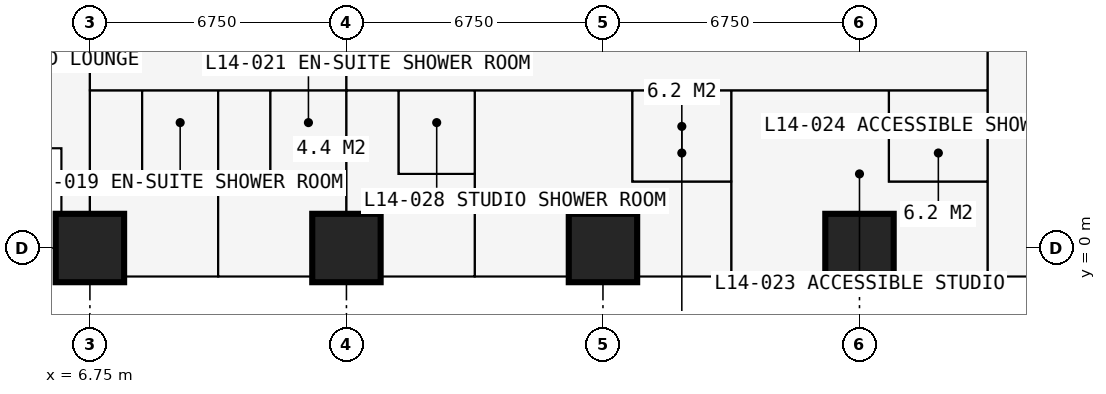
"""IFC4 building model, lengths in metres.
Left out: names, types, materials, properties, quantities, classifications, styles, units other than length and angle.
Written with IfcOpenShell. Run it as: python <this file> out.ifc"""

import sys

from ifc_helpers import new_model, si_unit, direction, frame, frame_2d, origin, origin_2d, place, context, subcontext, project, spatial, rectangle, extrude, element, fill, save


model = new_model("IFC4")
c1 = context("Model", 3, precision=1e-05, world=origin(), true_north=direction((0.0, 1.0)))
c2 = subcontext(c1, "Body", "Model", "MODEL_VIEW")
j1 = project(units=[si_unit("LENGTHUNIT", "METRE"), si_unit("PLANEANGLEUNIT", "RADIAN")], contexts=[c1])
p1 = place(None, origin())
s1 = spatial("IfcSite", under=j1, at=p1, CompositionType="ELEMENT")
p2 = place(p1, origin())
s2 = spatial("IfcBuilding", under=s1, at=p2, CompositionType="ELEMENT")
p3 = place(p2, frame((0.0, 0.0, 54.0)))
s3 = spatial("IfcBuildingStorey", under=s2, at=p3, CompositionType="ELEMENT", Elevation=54.0)
for number, where, z_axis, x_axis in (
    (1, (6.75, 0.0, 0.0), (0.0, 0.0, 1.0), (1.0, 0.0, 0.0)),
    (2, (13.5, 0.0, 0.0), (0.0, 0.0, 1.0), (1.0, 0.0, 0.0)),
    (3, (20.25, 0.0, 0.0), (0.0, 0.0, 1.0), (1.0, 0.0, 0.0)),
    (4, (27.0, 0.0, 0.0), (0.0, 0.0, 1.0), (1.0, 0.0, 0.0)),
):
    element("IfcColumn", number, at=place(p3, frame(where, z_axis=z_axis, x_axis=x_axis)), inside=s3, PredefinedType="COLUMN", context=c2, shape_type="SweptSolid", body=[
        extrude(rectangle(XDim=1.8, YDim=1.8, at=origin_2d()), origin(), (0.0, 0.0, 1.0), 3.6),
    ])
p4 = place(p3, frame((2.625, 2.625, 0.0), z_axis=(0.0, 0.0, 1.0), x_axis=(1.0, 0.0, 0.0)))
e5 = element("IfcWall", 5, at=p4, inside=s3, PredefinedType="SOLIDWALL", context=c2, shape_type="SweptSolid", body=[
    extrude(rectangle(XDim=3.375, YDim=0.3, at=frame_2d((1.688, 0.0))), origin(), (0.0, 0.0, 1.0), 3.375),
])
p5 = place(p4, frame((0.788, 0.0, 0.6)))
e6 = element("IfcOpeningElement", 6, at=p5, cuts=e5, PredefinedType="OPENING", context=c2, shape_type="SweptSolid", body=[
    extrude(rectangle(XDim=1.8, YDim=2.1, at=frame_2d((0.9, 1.05))), frame((0.0, 0.16, 0.0), z_axis=(0.0, -1.0, 0.0), x_axis=(1.0, 0.0, 0.0)), (0.0, 0.0, 1.0), 0.32),
])
p6 = place(p3, frame((6.0, 2.625, 0.0), z_axis=(0.0, 0.0, 1.0), x_axis=(0.0, -1.0, 0.0)))
e7 = element("IfcWall", 7, at=p6, inside=s3, PredefinedType="SOLIDWALL", context=c2, shape_type="SweptSolid", body=[
    extrude(rectangle(XDim=3.375, YDim=0.3, at=frame_2d((1.688, 0.0))), origin(), (0.0, 0.0, 1.0), 3.375),
])
p7 = place(p6, frame((0.343, 0.0, 0.9)))
e8 = element("IfcOpeningElement", 8, at=p7, cuts=e7, PredefinedType="OPENING", context=c2, shape_type="SweptSolid", body=[
    extrude(rectangle(XDim=1.2, YDim=1.8, at=frame_2d((0.6, 0.9))), frame((0.0, 0.16, 0.0), z_axis=(0.0, -1.0, 0.0), x_axis=(1.0, 0.0, 0.0)), (0.0, 0.0, 1.0), 0.32),
])
p8 = place(p3, frame((20.25, -0.75, 0.0), z_axis=(0.0, 0.0, 1.0), x_axis=(-1.0, 0.0, 0.0)))
e9 = element("IfcWall", 9, at=p8, inside=s3, PredefinedType="SOLIDWALL", context=c2, shape_type="SweptSolid", body=[
    extrude(rectangle(XDim=6.75, YDim=0.15, at=frame_2d((3.375, 0.0))), origin(), (0.0, 0.0, 1.0), 3.375),
])
p9 = place(p8, frame((0.962, 0.0, 0.0)))
e10 = element("IfcOpeningElement", 10, at=p9, cuts=e9, PredefinedType="OPENING", context=c2, shape_type="SweptSolid", body=[
    extrude(rectangle(XDim=1.0, YDim=2.2, at=frame_2d((0.5, 1.1))), frame((0.0, 0.085, 0.0), z_axis=(0.0, -1.0, 0.0), x_axis=(1.0, 0.0, 0.0)), (0.0, 0.0, 1.0), 0.17),
])
p10 = place(p8, frame((2.025, 0.0, 0.9)))
e11 = element("IfcOpeningElement", 11, at=p10, cuts=e9, PredefinedType="OPENING", context=c2, shape_type="SweptSolid", body=[
    extrude(rectangle(XDim=1.2, YDim=1.8, at=frame_2d((0.6, 0.9))), frame((0.0, 0.085, 0.0), z_axis=(0.0, -1.0, 0.0), x_axis=(1.0, 0.0, 0.0)), (0.0, 0.0, 1.0), 0.17),
])
p11 = place(p8, frame((4.788, 0.0, 0.0)))
e12 = element("IfcOpeningElement", 12, at=p11, cuts=e9, PredefinedType="OPENING", context=c2, shape_type="SweptSolid", body=[
    extrude(rectangle(XDim=1.0, YDim=2.2, at=frame_2d((0.5, 1.1))), frame((0.0, 0.085, 0.0), z_axis=(0.0, -1.0, 0.0), x_axis=(1.0, 0.0, 0.0)), (0.0, 0.0, 1.0), 0.17),
])
p12 = place(p8, frame((3.525, 0.0, 0.9)))
e13 = element("IfcOpeningElement", 13, at=p12, cuts=e9, PredefinedType="OPENING", context=c2, shape_type="SweptSolid", body=[
    extrude(rectangle(XDim=1.2, YDim=1.8, at=frame_2d((0.6, 0.9))), frame((0.0, 0.085, 0.0), z_axis=(0.0, -1.0, 0.0), x_axis=(1.0, 0.0, 0.0)), (0.0, 0.0, 1.0), 0.17),
])
p13 = place(p3, frame((16.875, -0.85, 0.0), z_axis=(0.0, 0.0, 1.0), x_axis=(0.0, -1.0, 0.0)))
e14 = element("IfcWall", 14, at=p13, inside=s3, PredefinedType="USERDEFINED", context=c2, shape_type="SweptSolid", body=[
    extrude(rectangle(XDim=2.2, YDim=1.0, at=frame_2d((1.1, 0.0))), origin(), (0.0, 0.0, 1.0), 0.9),
])
p14 = place(p3, frame((6.75, -0.734, 0.0), z_axis=(0.0, 0.0, 1.0), x_axis=(0.0, 1.0, 0.0)))
e15 = element("IfcWall", 15, at=p14, inside=s3, PredefinedType="PARTITIONING", context=c2, shape_type="SweptSolid", body=[
    extrude(rectangle(XDim=10.859, YDim=0.15, at=frame_2d((5.429, 0.0))), origin(), (0.0, 0.0, 1.0), 2.877),
])
p15 = place(p3, frame((6.75, 4.15, 0.0), z_axis=(0.0, 0.0, 1.0), x_axis=(1.0, 0.0, 0.0)))
e16 = element("IfcWall", 16, at=p15, inside=s3, PredefinedType="PARTITIONING", context=c2, shape_type="SweptSolid", body=[
    extrude(rectangle(XDim=23.625, YDim=0.15, at=frame_2d((11.812, 0.0))), origin(), (0.0, 0.0, 1.0), 3.375),
])
p16 = place(p15, frame((0.2, 0.0, 0.0)))
e17 = element("IfcOpeningElement", 17, at=p16, cuts=e16, PredefinedType="OPENING", context=c2, shape_type="SweptSolid", body=[
    extrude(rectangle(XDim=0.95, YDim=2.2, at=frame_2d((0.475, 1.1))), frame((0.0, 0.085, 0.0), z_axis=(0.0, -1.0, 0.0), x_axis=(1.0, 0.0, 0.0)), (0.0, 0.0, 1.0), 0.17),
])
p17 = place(p15, frame((3.625, 0.0, 0.0)))
e18 = element("IfcOpeningElement", 18, at=p17, cuts=e16, PredefinedType="OPENING", context=c2, shape_type="SweptSolid", body=[
    extrude(rectangle(XDim=0.95, YDim=2.2, at=frame_2d((0.475, 1.1))), frame((0.0, 0.085, 0.0), z_axis=(0.0, -1.0, 0.0), x_axis=(1.0, 0.0, 0.0)), (0.0, 0.0, 1.0), 0.17),
])
p18 = place(p15, frame((18.475, 0.0, 0.0)))
e19 = element("IfcOpeningElement", 19, at=p18, cuts=e16, PredefinedType="OPENING", context=c2, shape_type="SweptSolid", body=[
    extrude(rectangle(XDim=0.95, YDim=2.2, at=frame_2d((0.475, 1.1))), frame((0.0, 0.085, 0.0), z_axis=(0.0, -1.0, 0.0), x_axis=(1.0, 0.0, 0.0)), (0.0, 0.0, 1.0), 0.17),
])
p19 = place(p15, frame((11.725, 0.0, 0.0)))
e20 = element("IfcOpeningElement", 20, at=p19, cuts=e16, PredefinedType="OPENING", context=c2, shape_type="SweptSolid", body=[
    extrude(rectangle(XDim=0.95, YDim=2.2, at=frame_2d((0.475, 1.1))), frame((0.0, 0.085, 0.0), z_axis=(0.0, -1.0, 0.0), x_axis=(1.0, 0.0, 0.0)), (0.0, 0.0, 1.0), 0.17),
])
p20 = place(p15, frame((6.95, 0.0, 0.0)))
e21 = element("IfcOpeningElement", 21, at=p20, cuts=e16, PredefinedType="OPENING", context=c2, shape_type="SweptSolid", body=[
    extrude(rectangle(XDim=0.95, YDim=2.2, at=frame_2d((0.475, 1.1))), frame((0.0, 0.085, 0.0), z_axis=(0.0, -1.0, 0.0), x_axis=(1.0, 0.0, 0.0)), (0.0, 0.0, 1.0), 0.17),
])
p21 = place(p3, frame((8.125, 1.95, 0.0), z_axis=(0.0, 0.0, 1.0), x_axis=(0.0, 1.0, 0.0)))
e22 = element("IfcWall", 22, at=p21, inside=s3, PredefinedType="PARTITIONING", context=c2, shape_type="SweptSolid", body=[
    extrude(rectangle(XDim=2.2, YDim=0.1, at=frame_2d((1.1, 0.0))), origin(), (0.0, 0.0, 1.0), 3.375),
])
p22 = place(p21, frame((0.65, 0.0, 0.0)))
e23 = element("IfcOpeningElement", 23, at=p22, cuts=e22, PredefinedType="OPENING", context=c2, shape_type="SweptSolid", body=[
    extrude(rectangle(XDim=0.9, YDim=2.2, at=frame_2d((0.45, 1.1))), frame((0.0, 0.06, 0.0), z_axis=(0.0, -1.0, 0.0), x_axis=(1.0, 0.0, 0.0)), (0.0, 0.0, 1.0), 0.12),
])
p23 = place(p3, frame((8.125, 1.95, 0.0), z_axis=(0.0, 0.0, 1.0), x_axis=(1.0, 0.0, 0.0)))
e24 = element("IfcWall", 24, at=p23, inside=s3, PredefinedType="PARTITIONING", context=c2, shape_type="SweptSolid", body=[
    extrude(rectangle(XDim=2.0, YDim=0.1, at=frame_2d((1.0, 0.0))), origin(), (0.0, 0.0, 1.0), 3.375),
])
p24 = place(p3, frame((10.125, -0.734, 0.0), z_axis=(0.0, 0.0, 1.0), x_axis=(0.0, 1.0, 0.0)))
e25 = element("IfcWall", 25, at=p24, inside=s3, PredefinedType="PARTITIONING", context=c2, shape_type="SweptSolid", body=[
    extrude(rectangle(XDim=4.884, YDim=0.175, at=frame_2d((2.442, 0.0))), origin(), (0.0, 0.0, 1.0), 3.375),
])
p25 = place(p3, frame((11.5, 1.95, 0.0), z_axis=(0.0, 0.0, 1.0), x_axis=(0.0, 1.0, 0.0)))
e26 = element("IfcWall", 26, at=p25, inside=s3, PredefinedType="PARTITIONING", context=c2, shape_type="SweptSolid", body=[
    extrude(rectangle(XDim=2.2, YDim=0.1, at=frame_2d((1.1, 0.0))), origin(), (0.0, 0.0, 1.0), 3.375),
])
p26 = place(p25, frame((0.65, 0.0, 0.0)))
e27 = element("IfcOpeningElement", 27, at=p26, cuts=e26, PredefinedType="OPENING", context=c2, shape_type="SweptSolid", body=[
    extrude(rectangle(XDim=0.9, YDim=2.2, at=frame_2d((0.45, 1.1))), frame((0.0, 0.06, 0.0), z_axis=(0.0, -1.0, 0.0), x_axis=(1.0, 0.0, 0.0)), (0.0, 0.0, 1.0), 0.12),
])
p27 = place(p3, frame((11.5, 1.95, 0.0), z_axis=(0.0, 0.0, 1.0), x_axis=(1.0, 0.0, 0.0)))
e28 = element("IfcWall", 28, at=p27, inside=s3, PredefinedType="PARTITIONING", context=c2, shape_type="SweptSolid", body=[
    extrude(rectangle(XDim=2.0, YDim=0.1, at=frame_2d((1.0, 0.0))), origin(), (0.0, 0.0, 1.0), 3.375),
])
p28 = place(p3, frame((13.5, -0.734, 0.0), z_axis=(0.0, 0.0, 1.0), x_axis=(0.0, 1.0, 0.0)))
e29 = element("IfcWall", 29, at=p28, inside=s3, PredefinedType="PARTITIONING", context=c2, shape_type="SweptSolid", body=[
    extrude(rectangle(XDim=12.034, YDim=0.15, at=frame_2d((6.017, 0.0))), origin(), (0.0, 0.0, 1.0), 2.877),
])
p29 = place(p3, frame((14.875, 1.95, 0.0), z_axis=(0.0, 0.0, 1.0), x_axis=(0.0, 1.0, 0.0)))
e30 = element("IfcWall", 30, at=p29, inside=s3, PredefinedType="PARTITIONING", context=c2, shape_type="SweptSolid", body=[
    extrude(rectangle(XDim=2.2, YDim=0.1, at=frame_2d((1.1, 0.0))), origin(), (0.0, 0.0, 1.0), 3.375),
])
p30 = place(p3, frame((14.875, 1.95, 0.0), z_axis=(0.0, 0.0, 1.0), x_axis=(1.0, 0.0, 0.0)))
e31 = element("IfcWall", 31, at=p30, inside=s3, PredefinedType="PARTITIONING", context=c2, shape_type="SweptSolid", body=[
    extrude(rectangle(XDim=2.0, YDim=0.1, at=frame_2d((1.0, 0.0))), origin(), (0.0, 0.0, 1.0), 3.375),
])
p31 = place(p3, frame((16.875, -0.734, 0.0), z_axis=(0.0, 0.0, 1.0), x_axis=(0.0, 1.0, 0.0)))
e32 = element("IfcWall", 32, at=p31, inside=s3, PredefinedType="PARTITIONING", context=c2, shape_type="SweptSolid", body=[
    extrude(rectangle(XDim=4.884, YDim=0.175, at=frame_2d((2.442, 0.0))), origin(), (0.0, 0.0, 1.0), 3.375),
])
p32 = place(p31, frame((3.334, 0.0, 0.0)))
e33 = element("IfcOpeningElement", 33, at=p32, cuts=e32, PredefinedType="OPENING", context=c2, shape_type="SweptSolid", body=[
    extrude(rectangle(XDim=0.9, YDim=2.2, at=frame_2d((0.45, 1.1))), frame((0.0, 0.097, 0.0), z_axis=(0.0, -1.0, 0.0), x_axis=(1.0, 0.0, 0.0)), (0.0, 0.0, 1.0), 0.195),
])
p33 = place(p3, frame((21.025, 1.75, 0.0), z_axis=(0.0, 0.0, 1.0), x_axis=(0.0, 1.0, 0.0)))
e34 = element("IfcWall", 34, at=p33, inside=s3, PredefinedType="PARTITIONING", context=c2, shape_type="SweptSolid", body=[
    extrude(rectangle(XDim=2.4, YDim=0.1, at=frame_2d((1.2, 0.0))), origin(), (0.0, 0.0, 1.0), 3.375),
])
p34 = place(p3, frame((21.025, 1.75, 0.0), z_axis=(0.0, 0.0, 1.0), x_axis=(1.0, 0.0, 0.0)))
e35 = element("IfcWall", 35, at=p34, inside=s3, PredefinedType="PARTITIONING", context=c2, shape_type="SweptSolid", body=[
    extrude(rectangle(XDim=2.6, YDim=0.1, at=frame_2d((1.3, 0.0))), origin(), (0.0, 0.0, 1.0), 3.375),
])
p35 = place(p3, frame((23.625, -0.734, 0.0), z_axis=(0.0, 0.0, 1.0), x_axis=(0.0, 1.0, 0.0)))
e36 = element("IfcWall", 36, at=p35, inside=s3, PredefinedType="PARTITIONING", context=c2, shape_type="SweptSolid", body=[
    extrude(rectangle(XDim=4.884, YDim=0.175, at=frame_2d((2.442, 0.0))), origin(), (0.0, 0.0, 1.0), 3.375),
])
p36 = place(p35, frame((3.234, 0.0, 0.0)))
e37 = element("IfcOpeningElement", 37, at=p36, cuts=e36, PredefinedType="OPENING", context=c2, shape_type="SweptSolid", body=[
    extrude(rectangle(XDim=0.9, YDim=2.2, at=frame_2d((0.45, 1.1))), frame((0.0, 0.097, 0.0), z_axis=(0.0, -1.0, 0.0), x_axis=(1.0, 0.0, 0.0)), (0.0, 0.0, 1.0), 0.195),
])
p37 = place(p3, frame((27.775, 1.75, 0.0), z_axis=(0.0, 0.0, 1.0), x_axis=(0.0, 1.0, 0.0)))
e38 = element("IfcWall", 38, at=p37, inside=s3, PredefinedType="PARTITIONING", context=c2, shape_type="SweptSolid", body=[
    extrude(rectangle(XDim=2.4, YDim=0.1, at=frame_2d((1.2, 0.0))), origin(), (0.0, 0.0, 1.0), 3.375),
])
p38 = place(p3, frame((27.775, 1.75, 0.0), z_axis=(0.0, 0.0, 1.0), x_axis=(1.0, 0.0, 0.0)))
e39 = element("IfcWall", 39, at=p38, inside=s3, PredefinedType="PARTITIONING", context=c2, shape_type="SweptSolid", body=[
    extrude(rectangle(XDim=2.6, YDim=0.1, at=frame_2d((1.3, 0.0))), origin(), (0.0, 0.0, 1.0), 3.375),
])
p39 = place(p38, frame((0.85, 0.0, 0.0)))
e40 = element("IfcOpeningElement", 40, at=p39, cuts=e39, PredefinedType="OPENING", context=c2, shape_type="SweptSolid", body=[
    extrude(rectangle(XDim=0.9, YDim=2.2, at=frame_2d((0.45, 1.1))), frame((0.0, 0.06, 0.0), z_axis=(0.0, -1.0, 0.0), x_axis=(1.0, 0.0, 0.0)), (0.0, 0.0, 1.0), 0.12),
])
p40 = place(p3, frame((30.375, -0.734, 0.0), z_axis=(0.0, 0.0, 1.0), x_axis=(0.0, 1.0, 0.0)))
e41 = element("IfcWall", 41, at=p40, inside=s3, PredefinedType="PARTITIONING", context=c2, shape_type="SweptSolid", body=[
    extrude(rectangle(XDim=12.034, YDim=0.15, at=frame_2d((6.017, 0.0))), origin(), (0.0, 0.0, 1.0), 3.375),
])
p41 = place(p40, frame((5.134, 0.0, 0.0)))
e42 = element("IfcOpeningElement", 42, at=p41, cuts=e41, PredefinedType="OPENING", context=c2, shape_type="SweptSolid", body=[
    extrude(rectangle(XDim=1.0, YDim=2.2, at=frame_2d((0.5, 1.1))), frame((0.0, 0.085, 0.0), z_axis=(0.0, -1.0, 0.0), x_axis=(1.0, 0.0, 0.0)), (0.0, 0.0, 1.0), 0.17),
])
p42 = place(p7, origin())
e43 = element("IfcWindow", 43, at=p42, inside=s3, PartitioningType="SINGLE_PANEL", PredefinedType="WINDOW", context=c2, shape_type="SweptSolid", body=[
    extrude(rectangle(XDim=1.2, YDim=1.8, at=frame_2d((0.6, 0.9))), frame((0.0, 0.03, 0.0), z_axis=(0.0, -1.0, 0.0), x_axis=(1.0, 0.0, 0.0)), (0.0, 0.0, 1.0), 0.06),
])
fill(e8, e43)
p43 = place(p9, origin())
e44 = element("IfcDoor", 44, at=p43, inside=s3, OperationType="SINGLE_SWING_LEFT", PredefinedType="DOOR", context=c2, shape_type="SweptSolid", body=[
    extrude(rectangle(XDim=1.0, YDim=2.2, at=frame_2d((0.5, 1.1))), frame((0.0, 0.025, 0.0), z_axis=(0.0, -1.0, 0.0), x_axis=(1.0, 0.0, 0.0)), (0.0, 0.0, 1.0), 0.05),
])
fill(e10, e44)
p44 = place(p10, origin())
e45 = element("IfcWindow", 45, at=p44, inside=s3, PartitioningType="SINGLE_PANEL", PredefinedType="WINDOW", context=c2, shape_type="SweptSolid", body=[
    extrude(rectangle(XDim=1.2, YDim=1.8, at=frame_2d((0.6, 0.9))), frame((0.0, 0.03, 0.0), z_axis=(0.0, -1.0, 0.0), x_axis=(1.0, 0.0, 0.0)), (0.0, 0.0, 1.0), 0.06),
])
fill(e11, e45)
p45 = place(p11, origin())
e46 = element("IfcDoor", 46, at=p45, inside=s3, OperationType="SINGLE_SWING_RIGHT", PredefinedType="DOOR", context=c2, shape_type="SweptSolid", body=[
    extrude(rectangle(XDim=1.0, YDim=2.2, at=frame_2d((0.5, 1.1))), frame((0.0, 0.025, 0.0), z_axis=(0.0, -1.0, 0.0), x_axis=(1.0, 0.0, 0.0)), (0.0, 0.0, 1.0), 0.05),
])
fill(e12, e46)
p46 = place(p12, origin())
e47 = element("IfcWindow", 47, at=p46, inside=s3, PartitioningType="SINGLE_PANEL", PredefinedType="WINDOW", context=c2, shape_type="SweptSolid", body=[
    extrude(rectangle(XDim=1.2, YDim=1.8, at=frame_2d((0.6, 0.9))), frame((0.0, 0.03, 0.0), z_axis=(0.0, -1.0, 0.0), x_axis=(1.0, 0.0, 0.0)), (0.0, 0.0, 1.0), 0.06),
])
fill(e13, e47)
p47 = place(p16, origin())
e48 = element("IfcDoor", 48, at=p47, inside=s3, OperationType="SINGLE_SWING_LEFT", PredefinedType="DOOR", context=c2, shape_type="SweptSolid", body=[
    extrude(rectangle(XDim=0.95, YDim=2.2, at=frame_2d((0.475, 1.1))), frame((0.0, 0.025, 0.0), z_axis=(0.0, -1.0, 0.0), x_axis=(1.0, 0.0, 0.0)), (0.0, 0.0, 1.0), 0.05),
])
fill(e17, e48)
p48 = place(p22, origin())
e49 = element("IfcDoor", 49, at=p48, inside=s3, OperationType="SINGLE_SWING_RIGHT", PredefinedType="DOOR", context=c2, shape_type="SweptSolid", body=[
    extrude(rectangle(XDim=0.9, YDim=2.2, at=frame_2d((0.45, 1.1))), frame((0.0, 0.025, 0.0), z_axis=(0.0, -1.0, 0.0), x_axis=(1.0, 0.0, 0.0)), (0.0, 0.0, 1.0), 0.05),
])
fill(e23, e49)
p49 = place(p17, origin())
e50 = element("IfcDoor", 50, at=p49, inside=s3, OperationType="SINGLE_SWING_LEFT", PredefinedType="DOOR", context=c2, shape_type="SweptSolid", body=[
    extrude(rectangle(XDim=0.95, YDim=2.2, at=frame_2d((0.475, 1.1))), frame((0.0, 0.025, 0.0), z_axis=(0.0, -1.0, 0.0), x_axis=(1.0, 0.0, 0.0)), (0.0, 0.0, 1.0), 0.05),
])
fill(e18, e50)
p50 = place(p26, origin())
e51 = element("IfcDoor", 51, at=p50, inside=s3, OperationType="SINGLE_SWING_RIGHT", PredefinedType="DOOR", context=c2, shape_type="SweptSolid", body=[
    extrude(rectangle(XDim=0.9, YDim=2.2, at=frame_2d((0.45, 1.1))), frame((0.0, 0.025, 0.0), z_axis=(0.0, -1.0, 0.0), x_axis=(1.0, 0.0, 0.0)), (0.0, 0.0, 1.0), 0.05),
])
fill(e27, e51)
p51 = place(p18, origin())
e52 = element("IfcDoor", 52, at=p51, inside=s3, OperationType="SINGLE_SWING_LEFT", PredefinedType="DOOR", context=c2, shape_type="SweptSolid", body=[
    extrude(rectangle(XDim=0.95, YDim=2.2, at=frame_2d((0.475, 1.1))), frame((0.0, 0.025, 0.0), z_axis=(0.0, -1.0, 0.0), x_axis=(1.0, 0.0, 0.0)), (0.0, 0.0, 1.0), 0.05),
])
fill(e19, e52)
p52 = place(p39, origin())
e53 = element("IfcDoor", 53, at=p52, inside=s3, OperationType="SINGLE_SWING_RIGHT", PredefinedType="DOOR", context=c2, shape_type="SweptSolid", body=[
    extrude(rectangle(XDim=0.9, YDim=2.2, at=frame_2d((0.45, 1.1))), frame((0.0, 0.025, 0.0), z_axis=(0.0, -1.0, 0.0), x_axis=(1.0, 0.0, 0.0)), (0.0, 0.0, 1.0), 0.05),
])
fill(e40, e53)
p53 = place(p19, origin())
e54 = element("IfcDoor", 54, at=p53, inside=s3, OperationType="SINGLE_SWING_LEFT", PredefinedType="DOOR", context=c2, shape_type="SweptSolid", body=[
    extrude(rectangle(XDim=0.95, YDim=2.2, at=frame_2d((0.475, 1.1))), frame((0.0, 0.025, 0.0), z_axis=(0.0, -1.0, 0.0), x_axis=(1.0, 0.0, 0.0)), (0.0, 0.0, 1.0), 0.05),
])
fill(e20, e54)
p54 = place(p36, origin())
e55 = element("IfcDoor", 55, at=p54, inside=s3, OperationType="SINGLE_SWING_RIGHT", PredefinedType="DOOR", context=c2, shape_type="SweptSolid", body=[
    extrude(rectangle(XDim=0.9, YDim=2.2, at=frame_2d((0.45, 1.1))), frame((0.0, 0.025, 0.0), z_axis=(0.0, -1.0, 0.0), x_axis=(1.0, 0.0, 0.0)), (0.0, 0.0, 1.0), 0.05),
])
fill(e37, e55)
p55 = place(p20, origin())
e56 = element("IfcDoor", 56, at=p55, inside=s3, OperationType="SINGLE_SWING_LEFT", PredefinedType="DOOR", context=c2, shape_type="SweptSolid", body=[
    extrude(rectangle(XDim=0.95, YDim=2.2, at=frame_2d((0.475, 1.1))), frame((0.0, 0.025, 0.0), z_axis=(0.0, -1.0, 0.0), x_axis=(1.0, 0.0, 0.0)), (0.0, 0.0, 1.0), 0.05),
])
fill(e21, e56)
p56 = place(p32, origin())
e57 = element("IfcDoor", 57, at=p56, inside=s3, OperationType="SINGLE_SWING_RIGHT", PredefinedType="DOOR", context=c2, shape_type="SweptSolid", body=[
    extrude(rectangle(XDim=0.9, YDim=2.2, at=frame_2d((0.45, 1.1))), frame((0.0, 0.025, 0.0), z_axis=(0.0, -1.0, 0.0), x_axis=(1.0, 0.0, 0.0)), (0.0, 0.0, 1.0), 0.05),
])
fill(e33, e57)
p57 = place(p41, origin())
e58 = element("IfcDoor", 58, at=p57, inside=s3, OperationType="SINGLE_SWING_LEFT", PredefinedType="DOOR", context=c2, shape_type="SweptSolid", body=[
    extrude(rectangle(XDim=1.0, YDim=2.2, at=frame_2d((0.5, 1.1))), frame((0.0, 0.025, 0.0), z_axis=(0.0, -1.0, 0.0), x_axis=(1.0, 0.0, 0.0)), (0.0, 0.0, 1.0), 0.05),
])
fill(e42, e58)
save(model, sys.argv[1])
